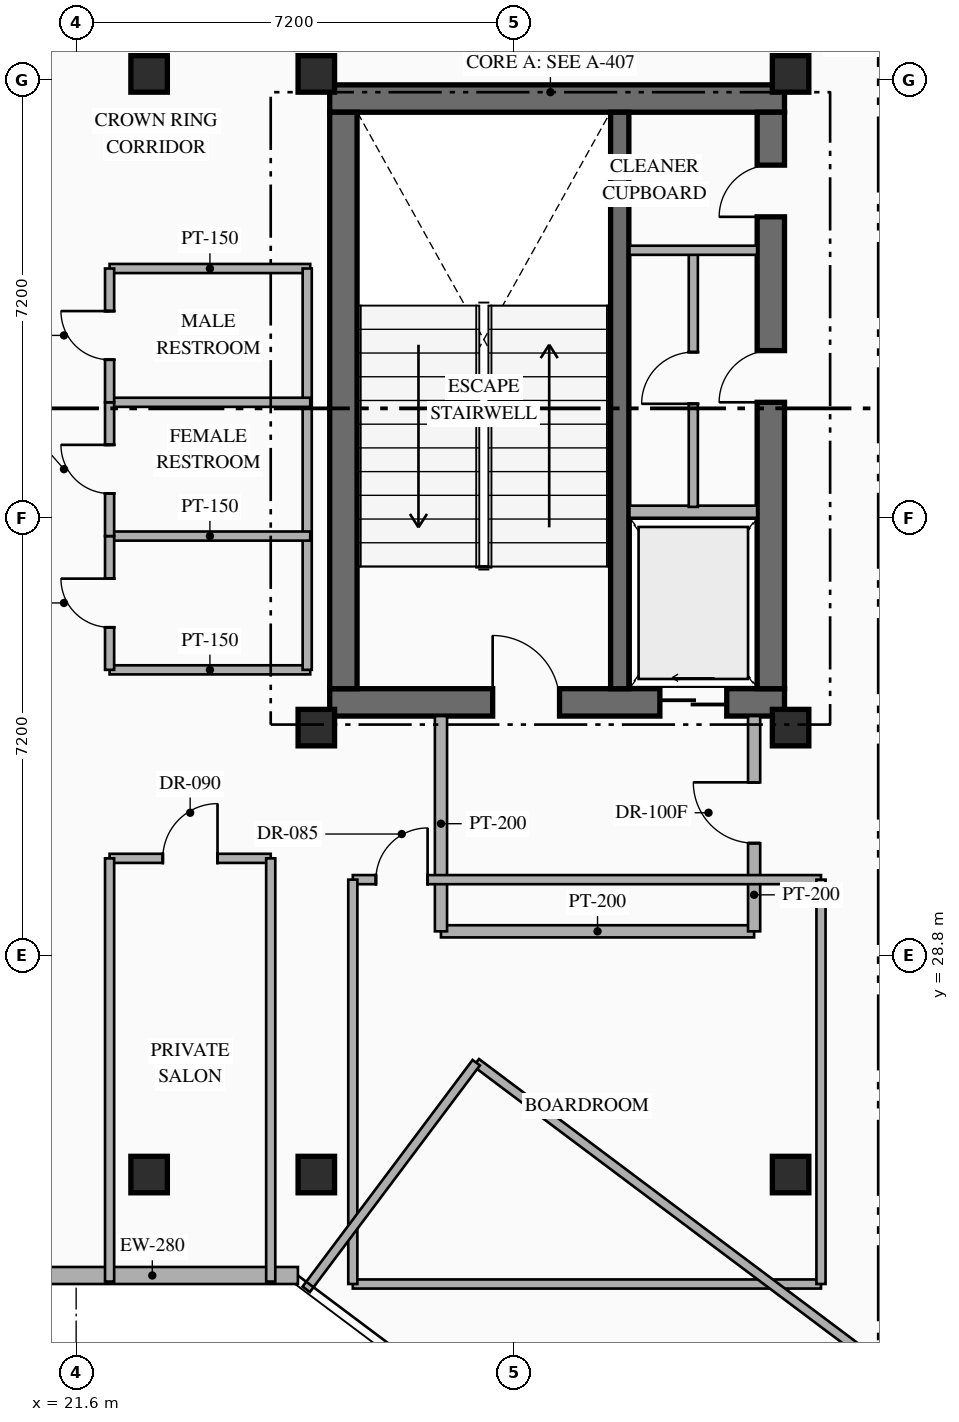
"""IFC4 building model, lengths in metres.
Left out: names, types, materials, properties, quantities, classifications, styles, units other than length and angle.
Written with IfcOpenShell. Run it as: python <this file> out.ifc"""

import sys

from ifc_helpers import new_model, si_unit, direction, frame, frame_2d, origin, origin_2d, place, context, subcontext, project, spatial, rectangle, hollow_rectangle, extrude, element, fill, save


model = new_model("IFC4")
c1 = context("Model", 3, precision=1e-05, world=origin(), true_north=direction((0.0, 1.0)))
c2 = subcontext(c1, "Body", "Model", "MODEL_VIEW")
j1 = project(units=[si_unit("LENGTHUNIT", "METRE"), si_unit("PLANEANGLEUNIT", "RADIAN")], contexts=[c1])
p1 = place(None, origin())
s1 = spatial("IfcSite", under=j1, at=p1, CompositionType="ELEMENT")
p2 = place(p1, origin())
s2 = spatial("IfcBuilding", under=s1, at=p2, CompositionType="ELEMENT")
p3 = place(p2, frame((0.0, 0.0, 265.95)))
s3 = spatial("IfcBuildingStorey", under=s2, at=p3, CompositionType="ELEMENT", Elevation=265.95)
p4 = place(p3, frame((25.77, 32.965, 0.0), z_axis=(0.0, 0.0, 1.0), x_axis=(1.0, 0.0, 0.0)))
e1 = element("IfcWall", 1, at=p4, inside=s3, PredefinedType="SHEAR", context=c2, shape_type="SweptSolid", body=[
    extrude(rectangle(XDim=7.48, YDim=0.45, at=frame_2d((3.74, 0.0))), origin(), (0.0, 0.0, 1.0), 4.0),
])
p5 = place(p4, frame((2.68, 0.0, 0.0)))
e2 = element("IfcOpeningElement", 2, at=p5, cuts=e1, PredefinedType="OPENING", context=c2, shape_type="SweptSolid", body=[
    extrude(rectangle(XDim=1.1, YDim=2.2, at=frame_2d((0.55, 1.1))), frame((0.0, 0.235, 0.0), z_axis=(0.0, -1.0, 0.0), x_axis=(1.0, 0.0, 0.0)), (0.0, 0.0, 1.0), 0.47),
])
p6 = place(p4, frame((5.43, 0.0, 0.0)))
e3 = element("IfcOpeningElement", 3, at=p6, cuts=e1, PredefinedType="OPENING", context=c2, shape_type="SweptSolid", body=[
    extrude(rectangle(XDim=1.1, YDim=2.15, at=frame_2d((0.55, 1.075))), frame((0.0, 0.235, 0.0), z_axis=(0.0, -1.0, 0.0), x_axis=(1.0, 0.0, 0.0)), (0.0, 0.0, 1.0), 0.47),
])
p7 = place(p3, frame((25.77, 42.895, 0.0), z_axis=(0.0, 0.0, 1.0), x_axis=(1.0, 0.0, 0.0)))
e4 = element("IfcWall", 4, at=p7, inside=s3, PredefinedType="SHEAR", context=c2, shape_type="SweptSolid", body=[
    extrude(rectangle(XDim=7.48, YDim=0.45, at=frame_2d((3.74, 0.0))), origin(), (0.0, 0.0, 1.0), 4.0),
])
p8 = place(p3, frame((25.995, 33.19, 0.0), z_axis=(0.0, 0.0, 1.0), x_axis=(0.0, 1.0, 0.0)))
e5 = element("IfcWall", 5, at=p8, inside=s3, PredefinedType="SHEAR", context=c2, shape_type="SweptSolid", body=[
    extrude(rectangle(XDim=9.48, YDim=0.45, at=frame_2d((4.74, 0.0))), origin(), (0.0, 0.0, 1.0), 4.0),
])
p9 = place(p3, frame((33.025, 33.19, 0.0), z_axis=(0.0, 0.0, 1.0), x_axis=(0.0, 1.0, 0.0)))
e6 = element("IfcWall", 6, at=p9, inside=s3, PredefinedType="SHEAR", context=c2, shape_type="SweptSolid", body=[
    extrude(rectangle(XDim=9.48, YDim=0.45, at=frame_2d((4.74, 0.0))), origin(), (0.0, 0.0, 1.0), 4.0),
])
p10 = place(p9, frame((4.71, 0.0, 0.0)))
e7 = element("IfcOpeningElement", 7, at=p10, cuts=e6, PredefinedType="OPENING", context=c2, shape_type="SweptSolid", body=[
    extrude(rectangle(XDim=0.85, YDim=2.08, at=frame_2d((0.425, 1.04))), frame((0.0, 0.235, 0.0), z_axis=(0.0, -1.0, 0.0), x_axis=(1.0, 0.0, 0.0)), (0.0, 0.0, 1.0), 0.47),
])
p11 = place(p9, frame((7.76, 0.0, 0.0)))
e8 = element("IfcOpeningElement", 8, at=p11, cuts=e6, PredefinedType="OPENING", context=c2, shape_type="SweptSolid", body=[
    extrude(rectangle(XDim=0.85, YDim=2.08, at=frame_2d((0.425, 1.04))), frame((0.0, 0.235, 0.0), z_axis=(0.0, -1.0, 0.0), x_axis=(1.0, 0.0, 0.0)), (0.0, 0.0, 1.0), 0.47),
])
p12 = place(p3, frame((30.54, 33.19, 0.0), z_axis=(0.0, 0.0, 1.0), x_axis=(0.0, 1.0, 0.0)))
e9 = element("IfcWall", 9, at=p12, inside=s3, PredefinedType="SHEAR", context=c2, shape_type="SweptSolid", body=[
    extrude(rectangle(XDim=9.48, YDim=0.3, at=frame_2d((4.74, 0.0))), origin(), (0.0, 0.0, 1.0), 4.0),
])
for number, where, z_axis, x_axis in (
    (10, (25.55, 32.55, 0.0), (0.0, 0.0, 1.0), (1.0, 0.0, 0.0)),
    (11, (33.35, 32.55, 0.0), (0.0, 0.0, 1.0), (1.0, 0.0, 0.0)),
    (12, (25.55, 43.3, 0.0), (0.0, 0.0, 1.0), (1.0, 0.0, 0.0)),
    (13, (33.35, 43.3, 0.0), (0.0, 0.0, 1.0), (1.0, 0.0, 0.0)),
    (14, (25.55, 25.2, 0.0), (0.0, 0.0, 1.0), (1.0, 0.0, 0.0)),
    (15, (33.35, 25.2, 0.0), (0.0, 0.0, 1.0), (1.0, 0.0, 0.0)),
    (16, (22.8, 25.2, 0.0), (0.0, 0.0, 1.0), (1.0, 0.0, 0.0)),
    (17, (22.8, 43.3, 0.0), (0.0, 0.0, 1.0), (1.0, 0.0, 0.0)),
):
    element("IfcColumn", number, at=place(p3, frame(where, z_axis=z_axis, x_axis=x_axis)), inside=s3, PredefinedType="COLUMN", context=c2, shape_type="SweptSolid", body=[
        extrude(hollow_rectangle(XDim=0.6, YDim=0.6, WallThickness=0.025, at=origin_2d()), origin(), (0.0, 0.0, 1.0), 4.0),
    ])
p13 = place(p3, frame((25.247, 23.54, 0.0), z_axis=(0.0, 0.0, 1.0), x_axis=(-1.0, 0.0, 0.0)))
e18 = element("IfcWall", 18, at=p13, inside=s3, PredefinedType="STANDARD", context=c2, shape_type="SweptSolid", body=[
    extrude(rectangle(XDim=4.789, YDim=0.28, at=frame_2d((2.395, 0.0))), origin(), (0.0, 0.0, 1.0), 3.75),
])
p14 = place(p3, frame((30.7, 36.1, 0.0), z_axis=(0.0, 0.0, 1.0), x_axis=(1.0, 0.0, 0.0)))
e19 = element("IfcWall", 19, at=p14, inside=s3, PredefinedType="STANDARD", context=c2, shape_type="SweptSolid", body=[
    extrude(rectangle(XDim=2.1, YDim=0.2, at=frame_2d((1.05, 0.0))), origin(), (0.0, 0.0, 1.0), 3.75),
])
p15 = place(p3, frame((31.75, 36.18, 0.0), z_axis=(0.0, 0.0, 1.0), x_axis=(0.0, 1.0, 0.0)))
e20 = element("IfcWall", 20, at=p15, inside=s3, PredefinedType="PARTITIONING", context=c2, shape_type="SweptSolid", body=[
    extrude(rectangle(XDim=4.24, YDim=0.15, at=frame_2d((2.12, 0.0))), origin(), (0.0, 0.0, 1.0), 3.75),
])
p16 = place(p15, frame((1.695, 0.0, 0.0)))
e21 = element("IfcOpeningElement", 21, at=p16, cuts=e20, PredefinedType="OPENING", context=c2, shape_type="SweptSolid", body=[
    extrude(rectangle(XDim=0.85, YDim=2.08, at=frame_2d((0.425, 1.04))), frame((0.0, 0.085, 0.0), z_axis=(0.0, -1.0, 0.0), x_axis=(1.0, 0.0, 0.0)), (0.0, 0.0, 1.0), 0.17),
])
p17 = place(p3, frame((30.7, 40.4, 0.0), z_axis=(0.0, 0.0, 1.0), x_axis=(1.0, 0.0, 0.0)))
e22 = element("IfcWall", 22, at=p17, inside=s3, PredefinedType="PARTITIONING", context=c2, shape_type="SweptSolid", body=[
    extrude(rectangle(XDim=2.1, YDim=0.15, at=frame_2d((1.05, 0.0))), origin(), (0.0, 0.0, 1.0), 3.75),
])
p18 = place(p3, frame((27.6, 29.2, 0.0), z_axis=(0.0, 0.0, 1.0), x_axis=(1.0, 0.0, 0.0)))
e23 = element("IfcWall", 23, at=p18, inside=s3, PredefinedType="STANDARD", context=c2, shape_type="SweptSolid", body=[
    extrude(rectangle(XDim=5.15, YDim=0.2, at=frame_2d((2.575, 0.0))), origin(), (0.0, 0.0, 1.0), 3.75),
])
p19 = place(p3, frame((27.6, 29.2, 0.0), z_axis=(0.0, 0.0, 1.0), x_axis=(0.0, 1.0, 0.0)))
e24 = element("IfcWall", 24, at=p19, inside=s3, PredefinedType="STANDARD", context=c2, shape_type="SweptSolid", body=[
    extrude(rectangle(XDim=3.54, YDim=0.2, at=frame_2d((1.77, 0.0))), origin(), (0.0, 0.0, 1.0), 3.75),
])
p20 = place(p3, frame((32.75, 29.2, 0.0), z_axis=(0.0, 0.0, 1.0), x_axis=(0.0, 1.0, 0.0)))
e25 = element("IfcWall", 25, at=p20, inside=s3, PredefinedType="STANDARD", context=c2, shape_type="SweptSolid", body=[
    extrude(rectangle(XDim=3.54, YDim=0.2, at=frame_2d((1.77, 0.0))), origin(), (0.0, 0.0, 1.0), 3.75),
])
p21 = place(p20, frame((1.45, 0.0, 0.0)))
e26 = element("IfcOpeningElement", 26, at=p21, cuts=e25, PredefinedType="OPENING", context=c2, shape_type="SweptSolid", body=[
    extrude(rectangle(XDim=1.0, YDim=2.2, at=frame_2d((0.5, 1.1))), frame((0.0, 0.11, 0.0), z_axis=(0.0, -1.0, 0.0), x_axis=(1.0, 0.0, 0.0)), (0.0, 0.0, 1.0), 0.22),
])
for number, where, z_axis, x_axis in (
    (27, (22.15, 33.5, 0.0), (0.0, 0.0, 1.0), (1.0, 0.0, 0.0)),
    (28, (22.15, 40.1, 0.0), (0.0, 0.0, 1.0), (1.0, 0.0, 0.0)),
):
    element("IfcWall", number, at=place(p3, frame(where, z_axis=z_axis, x_axis=x_axis)), inside=s3, PredefinedType="PARTITIONING", context=c2, shape_type="SweptSolid", body=[
        extrude(rectangle(XDim=3.3, YDim=0.15, at=frame_2d((1.65, 0.0))), origin(), (0.0, 0.0, 1.0), 3.75),
    ])
p22 = place(p3, frame((25.4, 33.5, 0.0), z_axis=(0.0, 0.0, 1.0), x_axis=(0.0, 1.0, 0.0)))
e29 = element("IfcWall", 29, at=p22, inside=s3, PredefinedType="PARTITIONING", context=c2, shape_type="SweptSolid", body=[
    extrude(rectangle(XDim=6.6, YDim=0.15, at=frame_2d((3.3, 0.0))), origin(), (0.0, 0.0, 1.0), 3.75),
])
for number, where, z_axis, x_axis in (
    (30, (22.15, 35.7, 0.0), (0.0, 0.0, 1.0), (1.0, 0.0, 0.0)),
    (31, (22.15, 37.9, 0.0), (0.0, 0.0, 1.0), (1.0, 0.0, 0.0)),
):
    element("IfcWall", number, at=place(p3, frame(where, z_axis=z_axis, x_axis=x_axis)), inside=s3, PredefinedType="PARTITIONING", context=c2, shape_type="SweptSolid", body=[
        extrude(rectangle(XDim=3.3, YDim=0.15, at=frame_2d((1.65, 0.0))), origin(), (0.0, 0.0, 1.0), 3.75),
    ])
p23 = place(p3, frame((22.15, 33.5, 0.0), z_axis=(0.0, 0.0, 1.0), x_axis=(0.0, 1.0, 0.0)))
e32 = element("IfcWall", 32, at=p23, inside=s3, PredefinedType="PARTITIONING", context=c2, shape_type="SweptSolid", body=[
    extrude(rectangle(XDim=2.2, YDim=0.15, at=frame_2d((1.1, 0.0))), origin(), (0.0, 0.0, 1.0), 3.75),
])
p24 = place(p23, frame((0.7, 0.0, 0.0)))
e33 = element("IfcOpeningElement", 33, at=p24, cuts=e32, PredefinedType="OPENING", context=c2, shape_type="SweptSolid", body=[
    extrude(rectangle(XDim=0.8, YDim=2.06, at=frame_2d((0.4, 1.03))), frame((0.0, 0.085, 0.0), z_axis=(0.0, -1.0, 0.0), x_axis=(1.0, 0.0, 0.0)), (0.0, 0.0, 1.0), 0.17),
])
p25 = place(p3, frame((22.15, 35.7, 0.0), z_axis=(0.0, 0.0, 1.0), x_axis=(0.0, 1.0, 0.0)))
e34 = element("IfcWall", 34, at=p25, inside=s3, PredefinedType="PARTITIONING", context=c2, shape_type="SweptSolid", body=[
    extrude(rectangle(XDim=2.2, YDim=0.15, at=frame_2d((1.1, 0.0))), origin(), (0.0, 0.0, 1.0), 3.75),
])
p26 = place(p25, frame((0.7, 0.0, 0.0)))
e35 = element("IfcOpeningElement", 35, at=p26, cuts=e34, PredefinedType="OPENING", context=c2, shape_type="SweptSolid", body=[
    extrude(rectangle(XDim=0.8, YDim=2.06, at=frame_2d((0.4, 1.03))), frame((0.0, 0.085, 0.0), z_axis=(0.0, -1.0, 0.0), x_axis=(1.0, 0.0, 0.0)), (0.0, 0.0, 1.0), 0.17),
])
p27 = place(p3, frame((22.15, 37.9, 0.0), z_axis=(0.0, 0.0, 1.0), x_axis=(0.0, 1.0, 0.0)))
e36 = element("IfcWall", 36, at=p27, inside=s3, PredefinedType="PARTITIONING", context=c2, shape_type="SweptSolid", body=[
    extrude(rectangle(XDim=2.2, YDim=0.15, at=frame_2d((1.1, 0.0))), origin(), (0.0, 0.0, 1.0), 3.75),
])
p28 = place(p27, frame((0.7, 0.0, 0.0)))
e37 = element("IfcOpeningElement", 37, at=p28, cuts=e36, PredefinedType="OPENING", context=c2, shape_type="SweptSolid", body=[
    extrude(rectangle(XDim=0.8, YDim=2.06, at=frame_2d((0.4, 1.03))), frame((0.0, 0.085, 0.0), z_axis=(0.0, -1.0, 0.0), x_axis=(1.0, 0.0, 0.0)), (0.0, 0.0, 1.0), 0.17),
])
p29 = place(p3, frame((26.15, 23.4, 0.0), z_axis=(0.0, 0.0, 1.0), x_axis=(1.0, 0.0, 0.0)))
e38 = element("IfcWall", 38, at=p29, inside=s3, PredefinedType="PARTITIONING", context=c2, shape_type="SweptSolid", body=[
    extrude(rectangle(XDim=7.7, YDim=0.15, at=frame_2d((3.85, 0.0))), origin(), (0.0, 0.0, 1.0), 3.75),
])
p30 = place(p3, frame((26.15, 30.05, 0.0), z_axis=(0.0, 0.0, 1.0), x_axis=(1.0, 0.0, 0.0)))
e39 = element("IfcWall", 39, at=p30, inside=s3, PredefinedType="PARTITIONING", context=c2, shape_type="SweptSolid", body=[
    extrude(rectangle(XDim=7.7, YDim=0.15, at=frame_2d((3.85, 0.0))), origin(), (0.0, 0.0, 1.0), 3.75),
])
p31 = place(p30, frame((0.38, 0.0, 0.0)))
e40 = element("IfcOpeningElement", 40, at=p31, cuts=e39, PredefinedType="OPENING", context=c2, shape_type="SweptSolid", body=[
    extrude(rectangle(XDim=0.85, YDim=2.08, at=frame_2d((0.425, 1.04))), frame((0.0, 0.085, 0.0), z_axis=(0.0, -1.0, 0.0), x_axis=(1.0, 0.0, 0.0)), (0.0, 0.0, 1.0), 0.17),
])
for number, where, z_axis, x_axis in (
    (41, (26.15, 23.4, 0.0), (0.0, 0.0, 1.0), (0.0, 1.0, 0.0)),
    (42, (33.85, 23.4, 0.0), (0.0, 0.0, 1.0), (0.0, 1.0, 0.0)),
):
    element("IfcWall", number, at=place(p3, frame(where, z_axis=z_axis, x_axis=x_axis)), inside=s3, PredefinedType="PARTITIONING", context=c2, shape_type="SweptSolid", body=[
        extrude(rectangle(XDim=6.65, YDim=0.15, at=frame_2d((3.325, 0.0))), origin(), (0.0, 0.0, 1.0), 3.75),
    ])
p32 = place(p3, frame((28.18, 27.04, 0.0), z_axis=(0.0, 0.0, 1.0), x_axis=(0.8, -0.6, 0.0)))
e43 = element("IfcWall", 43, at=p32, inside=s3, PredefinedType="PARTITIONING", context=c2, shape_type="SweptSolid", body=[
    extrude(rectangle(XDim=17.76, YDim=0.15, at=frame_2d((8.88, 0.0))), origin(), (0.0, 0.0, 1.0), 3.75),
])
p33 = place(p32, frame((11.65, 0.0, 0.0)))
e44 = element("IfcOpeningElement", 44, at=p33, cuts=e43, PredefinedType="OPENING", context=c2, shape_type="SweptSolid", body=[
    extrude(rectangle(XDim=0.9, YDim=2.15, at=frame_2d((0.45, 1.075))), frame((0.0, 0.085, 0.0), z_axis=(0.0, -1.0, 0.0), x_axis=(1.0, 0.0, 0.0)), (0.0, 0.0, 1.0), 0.17),
])
p34 = place(p3, frame((25.384, 23.312, 0.0), z_axis=(0.0, 0.0, 1.0), x_axis=(0.599983234706, 0.800012573696, 0.0)))
e45 = element("IfcWall", 45, at=p34, inside=s3, PredefinedType="PARTITIONING", context=c2, shape_type="SweptSolid", body=[
    extrude(rectangle(XDim=4.66, YDim=0.15, at=frame_2d((2.33, 0.0))), origin(), (0.0, 0.0, 1.0), 3.75),
])
p35 = place(p3, frame((22.15, 30.4, 0.0), z_axis=(0.0, 0.0, 1.0), x_axis=(1.0, 0.0, 0.0)))
e46 = element("IfcWall", 46, at=p35, inside=s3, PredefinedType="PARTITIONING", context=c2, shape_type="SweptSolid", body=[
    extrude(rectangle(XDim=2.65, YDim=0.15, at=frame_2d((1.325, 0.0))), origin(), (0.0, 0.0, 1.0), 3.75),
])
p36 = place(p35, frame((0.875, 0.0, 0.0)))
e47 = element("IfcOpeningElement", 47, at=p36, cuts=e46, PredefinedType="OPENING", context=c2, shape_type="SweptSolid", body=[
    extrude(rectangle(XDim=0.9, YDim=2.15, at=frame_2d((0.45, 1.075))), frame((0.0, 0.085, 0.0), z_axis=(0.0, -1.0, 0.0), x_axis=(1.0, 0.0, 0.0)), (0.0, 0.0, 1.0), 0.17),
])
for number, where, z_axis, x_axis in (
    (48, (22.15, 23.44, 0.0), (0.0, 0.0, 1.0), (0.0, 1.0, 0.0)),
    (49, (24.8, 23.44, 0.0), (0.0, 0.0, 1.0), (0.0, 1.0, 0.0)),
):
    element("IfcWall", number, at=place(p3, frame(where, z_axis=z_axis, x_axis=x_axis)), inside=s3, PredefinedType="PARTITIONING", context=c2, shape_type="SweptSolid", body=[
        extrude(rectangle(XDim=6.96, YDim=0.15, at=frame_2d((3.48, 0.0))), origin(), (0.0, 0.0, 1.0), 3.75),
    ])
p37 = place(p5, origin())
e50 = element("IfcDoor", 50, at=p37, inside=s3, OperationType="SINGLE_SWING_LEFT", PredefinedType="DOOR", context=c2, shape_type="SweptSolid", body=[
    extrude(rectangle(XDim=1.1, YDim=2.2, at=frame_2d((0.55, 1.1))), frame((0.0, 0.025, 0.0), z_axis=(0.0, -1.0, 0.0), x_axis=(1.0, 0.0, 0.0)), (0.0, 0.0, 1.0), 0.05),
])
fill(e2, e50)
p38 = place(p6, origin())
e51 = element("IfcDoor", 51, at=p38, inside=s3, OperationType="SLIDING_TO_LEFT", PredefinedType="USERDEFINED", context=c2, shape_type="SweptSolid", body=[
    extrude(rectangle(XDim=1.1, YDim=2.15, at=frame_2d((0.55, 1.075))), frame((0.0, 0.025, 0.0), z_axis=(0.0, -1.0, 0.0), x_axis=(1.0, 0.0, 0.0)), (0.0, 0.0, 1.0), 0.05),
])
fill(e3, e51)
p39 = place(p10, origin())
e52 = element("IfcDoor", 52, at=p39, inside=s3, OperationType="SINGLE_SWING_LEFT", PredefinedType="DOOR", context=c2, shape_type="SweptSolid", body=[
    extrude(rectangle(XDim=0.85, YDim=2.08, at=frame_2d((0.425, 1.04))), frame((0.0, 0.025, 0.0), z_axis=(0.0, -1.0, 0.0), x_axis=(1.0, 0.0, 0.0)), (0.0, 0.0, 1.0), 0.05),
])
fill(e7, e52)
p40 = place(p11, origin())
e53 = element("IfcDoor", 53, at=p40, inside=s3, OperationType="SINGLE_SWING_LEFT", PredefinedType="DOOR", context=c2, shape_type="SweptSolid", body=[
    extrude(rectangle(XDim=0.85, YDim=2.08, at=frame_2d((0.425, 1.04))), frame((0.0, 0.025, 0.0), z_axis=(0.0, -1.0, 0.0), x_axis=(1.0, 0.0, 0.0)), (0.0, 0.0, 1.0), 0.05),
])
fill(e8, e53)
p41 = place(p16, origin())
e54 = element("IfcDoor", 54, at=p41, inside=s3, OperationType="SINGLE_SWING_LEFT", PredefinedType="DOOR", context=c2, shape_type="SweptSolid", body=[
    extrude(rectangle(XDim=0.85, YDim=2.08, at=frame_2d((0.425, 1.04))), frame((0.0, 0.025, 0.0), z_axis=(0.0, -1.0, 0.0), x_axis=(1.0, 0.0, 0.0)), (0.0, 0.0, 1.0), 0.05),
])
fill(e21, e54)
p42 = place(p21, origin())
e55 = element("IfcDoor", 55, at=p42, inside=s3, OperationType="SINGLE_SWING_RIGHT", PredefinedType="DOOR", context=c2, shape_type="SweptSolid", body=[
    extrude(rectangle(XDim=1.0, YDim=2.2, at=frame_2d((0.5, 1.1))), frame((0.0, 0.025, 0.0), z_axis=(0.0, -1.0, 0.0), x_axis=(1.0, 0.0, 0.0)), (0.0, 0.0, 1.0), 0.05),
])
fill(e26, e55)
p43 = place(p24, origin())
e56 = element("IfcDoor", 56, at=p43, inside=s3, OperationType="SINGLE_SWING_RIGHT", PredefinedType="DOOR", context=c2, shape_type="SweptSolid", body=[
    extrude(rectangle(XDim=0.8, YDim=2.06, at=frame_2d((0.4, 1.03))), frame((0.0, 0.025, 0.0), z_axis=(0.0, -1.0, 0.0), x_axis=(1.0, 0.0, 0.0)), (0.0, 0.0, 1.0), 0.05),
])
fill(e33, e56)
p44 = place(p26, origin())
e57 = element("IfcDoor", 57, at=p44, inside=s3, OperationType="SINGLE_SWING_RIGHT", PredefinedType="DOOR", context=c2, shape_type="SweptSolid", body=[
    extrude(rectangle(XDim=0.8, YDim=2.06, at=frame_2d((0.4, 1.03))), frame((0.0, 0.025, 0.0), z_axis=(0.0, -1.0, 0.0), x_axis=(1.0, 0.0, 0.0)), (0.0, 0.0, 1.0), 0.05),
])
fill(e35, e57)
p45 = place(p28, origin())
e58 = element("IfcDoor", 58, at=p45, inside=s3, OperationType="SINGLE_SWING_RIGHT", PredefinedType="DOOR", context=c2, shape_type="SweptSolid", body=[
    extrude(rectangle(XDim=0.8, YDim=2.06, at=frame_2d((0.4, 1.03))), frame((0.0, 0.025, 0.0), z_axis=(0.0, -1.0, 0.0), x_axis=(1.0, 0.0, 0.0)), (0.0, 0.0, 1.0), 0.05),
])
fill(e37, e58)
p46 = place(p31, origin())
e59 = element("IfcDoor", 59, at=p46, inside=s3, OperationType="SINGLE_SWING_RIGHT", PredefinedType="DOOR", context=c2, shape_type="SweptSolid", body=[
    extrude(rectangle(XDim=0.85, YDim=2.08, at=frame_2d((0.425, 1.04))), frame((0.0, 0.025, 0.0), z_axis=(0.0, -1.0, 0.0), x_axis=(1.0, 0.0, 0.0)), (0.0, 0.0, 1.0), 0.05),
])
fill(e40, e59)
p47 = place(p36, origin())
e60 = element("IfcDoor", 60, at=p47, inside=s3, OperationType="SINGLE_SWING_RIGHT", PredefinedType="DOOR", context=c2, shape_type="SweptSolid", body=[
    extrude(rectangle(XDim=0.9, YDim=2.15, at=frame_2d((0.45, 1.075))), frame((0.0, 0.025, 0.0), z_axis=(0.0, -1.0, 0.0), x_axis=(1.0, 0.0, 0.0)), (0.0, 0.0, 1.0), 0.05),
])
fill(e47, e60)
save(model, sys.argv[1])
